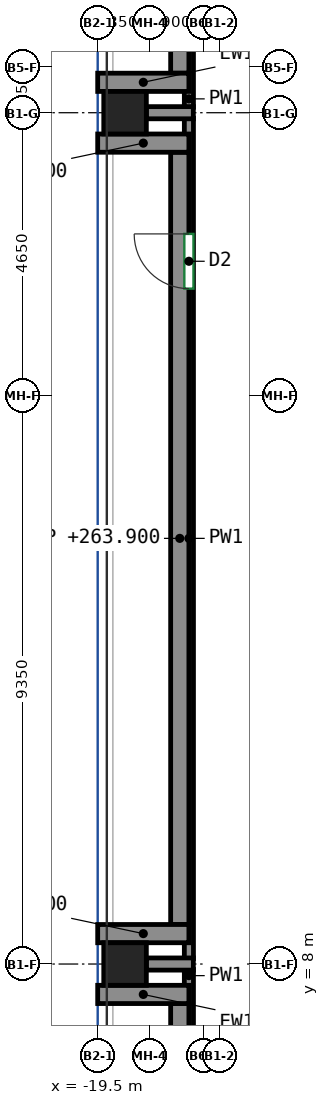
"""IFC4 building model, lengths in metres.
Left out: names, types, materials, properties, quantities, classifications, styles, units other than length and angle.
Written with IfcOpenShell. Run it as: python <this file> out.ifc"""

import sys

from ifc_helpers import new_model, si_unit, direction, frame, frame_2d, origin, origin_2d, place, context, subcontext, project, spatial, rectangle, extrude, source, transform, mapped, element, fill, save


model = new_model("IFC4")
c1 = context("Model", 3, precision=1e-05, world=origin(), true_north=direction((0.0, 1.0)))
c2 = subcontext(c1, "Body", "Model", "MODEL_VIEW")
j1 = project(units=[si_unit("LENGTHUNIT", "METRE"), si_unit("PLANEANGLEUNIT", "RADIAN")], contexts=[c1])
p1 = place(None, origin())
s1 = spatial("IfcSite", under=j1, at=p1, CompositionType="ELEMENT")
p2 = place(p1, origin())
s2 = spatial("IfcBuilding", under=s1, at=p2, CompositionType="ELEMENT")
p3 = place(p2, frame((0.0, 0.0, 262.8)))
s3 = spatial("IfcBuildingStorey", under=s2, at=p3, CompositionType="ELEMENT", Elevation=262.8)
m1 = source(origin(), c2, "Body", "SweptSolid", [
    extrude(rectangle(XDim=0.7, YDim=0.7, at=origin_2d()), origin(), (0.0, 0.0, 1.0), 3.8),
])
for number, where, z_axis, x_axis in (
    (1, (-19.05, 8.0, 0.0), (0.0, 0.0, 1.0), (1.0, 0.0, 0.0)),
    (2, (-19.05, 22.0, 0.0), (0.0, 0.0, 1.0), (1.0, 0.0, 0.0)),
):
    element("IfcColumn", number, at=place(p3, frame(where, z_axis=z_axis, x_axis=x_axis)), inside=s3, PredefinedType="COLUMN", context=c2, shape_type="MappedRepresentation", body=[
        mapped(m1, transform((0.0, 0.0, 0.0))),
    ])
m2 = source(origin(), c2, "Body", "SweptSolid", [
    extrude(rectangle(XDim=3.382, YDim=0.3, at=frame_2d((1.691, 0.0))), origin(), (0.0, 0.0, 1.0), 1.1),
])
p4 = place(p3, frame((-18.15, 26.032, 0.0), z_axis=(0.0, 0.0, 1.0), x_axis=(0.0, -1.0, 0.0)))
e3 = element("IfcWall", 3, at=p4, inside=s3, PredefinedType="SOLIDWALL", context=c2, shape_type="MappedRepresentation", body=[
    mapped(m2, transform((0.0, 0.0, 0.0))),
])
m3 = source(origin(), c2, "Body", "SweptSolid", [
    extrude(rectangle(XDim=1.5, YDim=0.3, at=frame_2d((0.75, 0.0))), origin(), (0.0, 0.0, 1.0), 3.8),
])
p5 = place(p3, frame((-19.5, 22.5, 0.0), z_axis=(0.0, 0.0, 1.0), x_axis=(1.0, 0.0, 0.0)))
e4 = element("IfcWall", 4, at=p5, inside=s3, PredefinedType="SOLIDWALL", context=c2, shape_type="MappedRepresentation", body=[
    mapped(m3, transform((0.0, 0.0, 0.0))),
])
m4 = source(origin(), c2, "Body", "SweptSolid", [
    extrude(rectangle(XDim=12.7, YDim=0.3, at=frame_2d((6.35, 0.0))), origin(), (0.0, 0.0, 1.0), 1.1),
])
p6 = place(p3, frame((-18.15, 21.35, 0.0), z_axis=(0.0, 0.0, 1.0), x_axis=(0.0, -1.0, 0.0)))
e5 = element("IfcWall", 5, at=p6, inside=s3, PredefinedType="SOLIDWALL", context=c2, shape_type="MappedRepresentation", body=[
    mapped(m4, transform((0.0, 0.0, 0.0))),
])
for number, where, z_axis, x_axis in (
    (6, (-19.5, 21.5, 0.0), (0.0, 0.0, 1.0), (1.0, 0.0, 0.0)),
    (7, (-19.5, 8.5, 0.0), (0.0, 0.0, 1.0), (1.0, 0.0, 0.0)),
):
    element("IfcWall", number, at=place(p3, frame(where, z_axis=z_axis, x_axis=x_axis)), inside=s3, PredefinedType="SOLIDWALL", context=c2, shape_type="MappedRepresentation", body=[
        mapped(m3, transform((0.0, 0.0, 0.0))),
    ])
m5 = source(origin(), c2, "Body", "SweptSolid", [
    extrude(rectangle(XDim=7.533, YDim=0.3, at=frame_2d((3.767, 0.0))), origin(), (0.0, 0.0, 1.0), 1.1),
])
p7 = place(p3, frame((-18.15, 7.35, 0.0), z_axis=(0.0, 0.0, 1.0), x_axis=(0.0, -1.0, 0.0)))
e8 = element("IfcWall", 8, at=p7, inside=s3, PredefinedType="SOLIDWALL", context=c2, shape_type="MappedRepresentation", body=[
    mapped(m5, transform((0.0, 0.0, 0.0))),
])
p8 = place(p3, frame((-19.5, 7.5, 0.0), z_axis=(0.0, 0.0, 1.0), x_axis=(1.0, 0.0, 0.0)))
e9 = element("IfcWall", 9, at=p8, inside=s3, PredefinedType="SOLIDWALL", context=c2, shape_type="MappedRepresentation", body=[
    mapped(m3, transform((0.0, 0.0, 0.0))),
])
p9 = place(p3, frame((-18.0, 3.875, 0.0), z_axis=(0.0, 0.0, 1.0), x_axis=(0.0, 1.0, 0.0)))
e10 = element("IfcWall", 10, at=p9, inside=s3, PredefinedType="PARTITIONING", context=c2, shape_type="SweptSolid", body=[
    extrude(rectangle(XDim=4.035, YDim=0.15, at=frame_2d((2.018, 0.0))), origin(), (0.0, 0.0, 1.0), 3.8),
])
p10 = place(p3, frame((-18.0, 22.09, 0.0), z_axis=(0.0, 0.0, 1.0), x_axis=(0.0, 1.0, 0.0)))
e11 = element("IfcWall", 11, at=p10, inside=s3, PredefinedType="PARTITIONING", context=c2, shape_type="SweptSolid", body=[
    extrude(rectangle(XDim=1.835, YDim=0.15, at=frame_2d((0.917, 0.0))), origin(), (0.0, 0.0, 1.0), 3.8),
])
p11 = place(p3, frame((-18.0, 8.09, 0.0), z_axis=(0.0, 0.0, 1.0), x_axis=(0.0, 1.0, 0.0)))
e12 = element("IfcWall", 12, at=p11, inside=s3, PredefinedType="PARTITIONING", context=c2, shape_type="SweptSolid", body=[
    extrude(rectangle(XDim=13.82, YDim=0.15, at=frame_2d((6.91, 0.0))), origin(), (0.0, 0.0, 1.0), 3.8),
])
p12 = place(p11, frame((11.017, 0.0, 0.0)))
e13 = element("IfcOpeningElement", 13, at=p12, cuts=e12, PredefinedType="OPENING", context=c2, shape_type="SweptSolid", body=[
    extrude(rectangle(XDim=0.9, YDim=2.1, at=frame_2d((0.45, 1.05))), frame((0.0, 0.085, 0.0), z_axis=(0.0, -1.0, 0.0), x_axis=(1.0, 0.0, 0.0)), (0.0, 0.0, 1.0), 0.17),
])
for number, where, z_axis, x_axis in (
    (14, (-17.927, 8.0, 0.0), (0.0, 0.0, 1.0), (-1.0, 0.0, 0.0)),
    (15, (-18.7, 22.0, 0.0), (0.0, 0.0, 1.0), (1.0, 0.0, 0.0)),
):
    element("IfcWall", number, at=place(p3, frame(where, z_axis=z_axis, x_axis=x_axis)), inside=s3, PredefinedType="PARTITIONING", context=c2, shape_type="SweptSolid", body=[
        extrude(rectangle(XDim=0.773, YDim=0.2, at=frame_2d((0.386, 0.0))), origin(), (0.0, 0.0, 1.0), 3.8),
    ])
p13 = place(p12, origin())
e16 = element("IfcDoor", 16, at=p13, inside=s3, OperationType="SINGLE_SWING_RIGHT", PredefinedType="DOOR", context=c2, shape_type="SweptSolid", body=[
    extrude(rectangle(XDim=0.9, YDim=2.1, at=frame_2d((0.45, 1.05))), frame((0.0, -0.005, 0.0), z_axis=(0.0, -1.0, 0.0), x_axis=(1.0, 0.0, 0.0)), (0.0, 0.0, 1.0), 0.05),
])
fill(e13, e16)
save(model, sys.argv[1])
